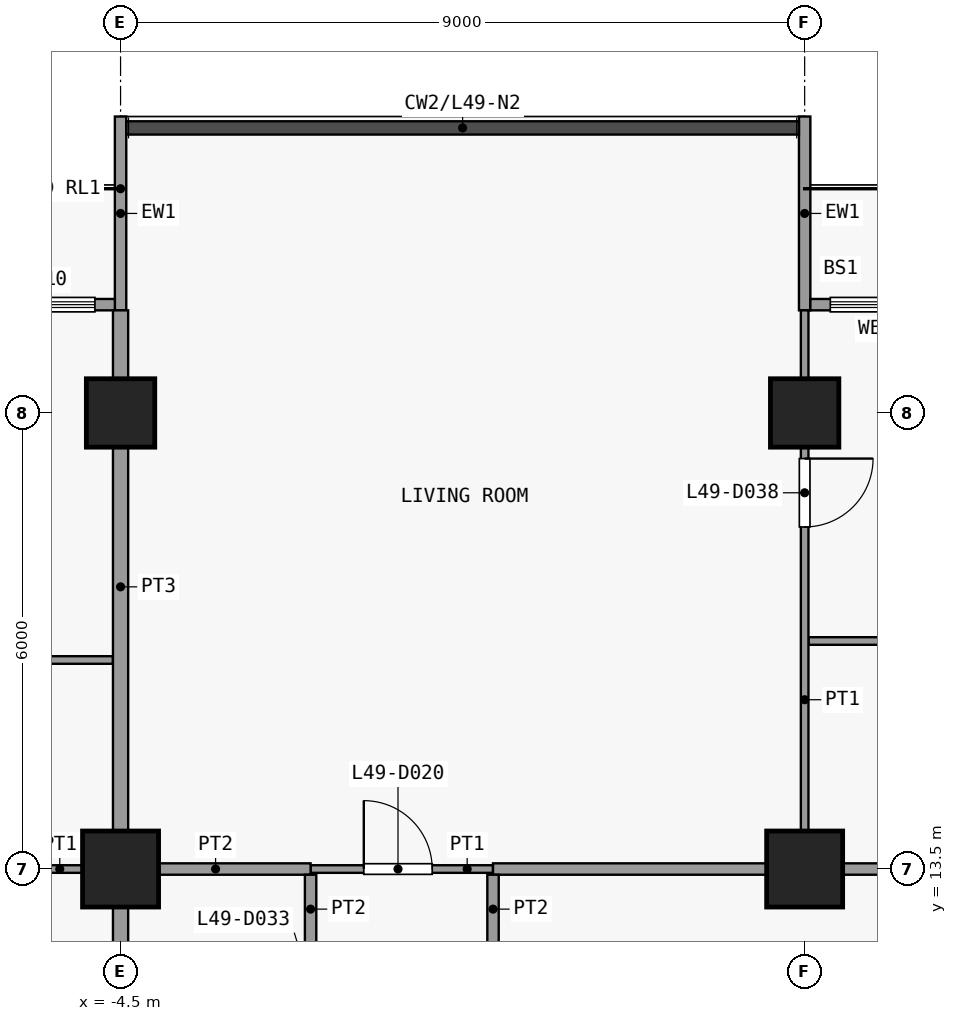
"""IFC4 building model, lengths in metres.
Left out: names, types, materials, properties, quantities, classifications, styles, units other than length and angle.
Written with IfcOpenShell. Run it as: python <this file> out.ifc"""

import sys

from ifc_helpers import new_model, si_unit, direction, frame, frame_2d, origin, origin_2d, place, context, subcontext, project, spatial, rectangle, extrude, element, fill, save


model = new_model("IFC4")
c1 = context("Model", 3, precision=1e-05, world=origin(), true_north=direction((0.0, 1.0)))
c2 = subcontext(c1, "Body", "Model", "MODEL_VIEW")
j1 = project(units=[si_unit("LENGTHUNIT", "METRE"), si_unit("PLANEANGLEUNIT", "RADIAN")], contexts=[c1])
p1 = place(None, origin())
s1 = spatial("IfcSite", under=j1, at=p1, CompositionType="ELEMENT")
p2 = place(p1, origin())
s2 = spatial("IfcBuilding", under=s1, at=p2, CompositionType="ELEMENT")
p3 = place(p2, frame((0.0, 0.0, 196.1)))
s3 = spatial("IfcBuildingStorey", under=s2, at=p3, CompositionType="ELEMENT", Elevation=196.1)
p4 = place(p3, frame((-4.5, 13.5, 0.0), z_axis=(0.0, 0.0, 1.0), x_axis=(1.0, 0.0, 0.0)))
e1 = element("IfcColumn", 1, at=p4, inside=s3, PredefinedType="COLUMN", context=c2, shape_type="SweptSolid", body=[
    extrude(rectangle(XDim=1.0, YDim=1.0, at=origin_2d()), origin(), (0.0, 0.0, 1.0), 3.6),
])
p5 = place(p3, frame((-4.5, 19.5, 0.0), z_axis=(0.0, 0.0, 1.0), x_axis=(1.0, 0.0, 0.0)))
e2 = element("IfcColumn", 2, at=p5, inside=s3, PredefinedType="COLUMN", context=c2, shape_type="SweptSolid", body=[
    extrude(rectangle(XDim=0.9, YDim=0.9, at=origin_2d()), origin(), (0.0, 0.0, 1.0), 3.6),
])
p6 = place(p3, frame((4.5, 13.5, 0.0), z_axis=(0.0, 0.0, 1.0), x_axis=(1.0, 0.0, 0.0)))
e3 = element("IfcColumn", 3, at=p6, inside=s3, PredefinedType="COLUMN", context=c2, shape_type="SweptSolid", body=[
    extrude(rectangle(XDim=1.0, YDim=1.0, at=origin_2d()), origin(), (0.0, 0.0, 1.0), 3.6),
])
p7 = place(p3, frame((4.5, 19.5, 0.0), z_axis=(0.0, 0.0, 1.0), x_axis=(1.0, 0.0, 0.0)))
e4 = element("IfcColumn", 4, at=p7, inside=s3, PredefinedType="COLUMN", context=c2, shape_type="SweptSolid", body=[
    extrude(rectangle(XDim=0.9, YDim=0.9, at=origin_2d()), origin(), (0.0, 0.0, 1.0), 3.6),
])
p8 = place(p3, frame((-4.5, 20.85, 0.0), z_axis=(0.0, 0.0, 1.0), x_axis=(0.0, 1.0, 0.0)))
e5 = element("IfcWall", 5, at=p8, inside=s3, PredefinedType="SOLIDWALL", context=c2, shape_type="SweptSolid", body=[
    extrude(rectangle(XDim=2.55, YDim=0.15, at=frame_2d((1.275, 0.0))), origin(), (0.0, 0.0, 1.0), 3.15),
])
p9 = place(p3, frame((-10.425, 20.925, 0.0), z_axis=(0.0, 0.0, 1.0), x_axis=(1.0, 0.0, 0.0)))
e6 = element("IfcWall", 6, at=p9, inside=s3, PredefinedType="SOLIDWALL", context=c2, shape_type="SweptSolid", body=[
    extrude(rectangle(XDim=5.85, YDim=0.15, at=frame_2d((2.925, 0.0))), origin(), (0.0, 0.0, 1.0), 3.15),
])
p10 = place(p9, frame((2.325, 0.0, 0.0)))
e7 = element("IfcOpeningElement", 7, at=p10, cuts=e6, PredefinedType="OPENING", context=c2, shape_type="SweptSolid", body=[
    extrude(rectangle(XDim=1.2, YDim=2.4, at=frame_2d((0.6, 1.2))), frame((0.0, 0.085, 0.0), z_axis=(0.0, -1.0, 0.0), x_axis=(1.0, 0.0, 0.0)), (0.0, 0.0, 1.0), 0.17),
])
p11 = place(p9, frame((0.262, 0.0, 0.9)))
e8 = element("IfcOpeningElement", 8, at=p11, cuts=e6, PredefinedType="OPENING", context=c2, shape_type="SweptSolid", body=[
    extrude(rectangle(XDim=1.8, YDim=2.1, at=frame_2d((0.9, 1.05))), frame((0.0, 0.085, 0.0), z_axis=(0.0, -1.0, 0.0), x_axis=(1.0, 0.0, 0.0)), (0.0, 0.0, 1.0), 0.17),
])
p12 = place(p9, frame((3.788, 0.0, 0.9)))
e9 = element("IfcOpeningElement", 9, at=p12, cuts=e6, PredefinedType="OPENING", context=c2, shape_type="SweptSolid", body=[
    extrude(rectangle(XDim=1.8, YDim=2.1, at=frame_2d((0.9, 1.05))), frame((0.0, 0.085, 0.0), z_axis=(0.0, -1.0, 0.0), x_axis=(1.0, 0.0, 0.0)), (0.0, 0.0, 1.0), 0.17),
])
p13 = place(p3, frame((4.5, 20.85, 0.0), z_axis=(0.0, 0.0, 1.0), x_axis=(0.0, 1.0, 0.0)))
e10 = element("IfcWall", 10, at=p13, inside=s3, PredefinedType="SOLIDWALL", context=c2, shape_type="SweptSolid", body=[
    extrude(rectangle(XDim=2.55, YDim=0.15, at=frame_2d((1.275, 0.0))), origin(), (0.0, 0.0, 1.0), 3.15),
])
p14 = place(p3, frame((4.575, 20.925, 0.0), z_axis=(0.0, 0.0, 1.0), x_axis=(1.0, 0.0, 0.0)))
e11 = element("IfcWall", 11, at=p14, inside=s3, PredefinedType="SOLIDWALL", context=c2, shape_type="SweptSolid", body=[
    extrude(rectangle(XDim=5.85, YDim=0.15, at=frame_2d((2.925, 0.0))), origin(), (0.0, 0.0, 1.0), 3.15),
])
p15 = place(p14, frame((2.325, 0.0, 0.0)))
e12 = element("IfcOpeningElement", 12, at=p15, cuts=e11, PredefinedType="OPENING", context=c2, shape_type="SweptSolid", body=[
    extrude(rectangle(XDim=1.2, YDim=2.4, at=frame_2d((0.6, 1.2))), frame((0.0, 0.085, 0.0), z_axis=(0.0, -1.0, 0.0), x_axis=(1.0, 0.0, 0.0)), (0.0, 0.0, 1.0), 0.17),
])
p16 = place(p14, frame((0.262, 0.0, 0.9)))
e13 = element("IfcOpeningElement", 13, at=p16, cuts=e11, PredefinedType="OPENING", context=c2, shape_type="SweptSolid", body=[
    extrude(rectangle(XDim=1.8, YDim=2.1, at=frame_2d((0.9, 1.05))), frame((0.0, 0.085, 0.0), z_axis=(0.0, -1.0, 0.0), x_axis=(1.0, 0.0, 0.0)), (0.0, 0.0, 1.0), 0.17),
])
p17 = place(p14, frame((3.788, 0.0, 0.9)))
e14 = element("IfcOpeningElement", 14, at=p17, cuts=e11, PredefinedType="OPENING", context=c2, shape_type="SweptSolid", body=[
    extrude(rectangle(XDim=1.8, YDim=2.1, at=frame_2d((0.9, 1.05))), frame((0.0, 0.085, 0.0), z_axis=(0.0, -1.0, 0.0), x_axis=(1.0, 0.0, 0.0)), (0.0, 0.0, 1.0), 0.17),
])
p18 = place(p3, frame((-6.1, 13.5, 0.0), z_axis=(0.0, 0.0, 1.0), x_axis=(1.0, 0.0, 0.0)))
e15 = element("IfcWall", 15, at=p18, inside=s3, PredefinedType="PARTITIONING", context=c2, shape_type="SweptSolid", body=[
    extrude(rectangle(XDim=1.6, YDim=0.1, at=frame_2d((0.8, 0.0))), origin(), (0.0, 0.0, 1.0), 3.15),
])
p19 = place(p3, frame((-2.0, 13.5, 0.0), z_axis=(0.0, 0.0, 1.0), x_axis=(1.0, 0.0, 0.0)))
e16 = element("IfcWall", 16, at=p19, inside=s3, PredefinedType="PARTITIONING", context=c2, shape_type="SweptSolid", body=[
    extrude(rectangle(XDim=2.4, YDim=0.1, at=frame_2d((1.2, 0.0))), origin(), (0.0, 0.0, 1.0), 3.15),
])
p20 = place(p19, frame((0.7, 0.0, 0.0)))
e17 = element("IfcOpeningElement", 17, at=p20, cuts=e16, PredefinedType="OPENING", context=c2, shape_type="SweptSolid", body=[
    extrude(rectangle(XDim=0.9, YDim=2.1, at=frame_2d((0.45, 1.05))), frame((0.0, 0.06, 0.0), z_axis=(0.0, -1.0, 0.0), x_axis=(1.0, 0.0, 0.0)), (0.0, 0.0, 1.0), 0.12),
])
p21 = place(p3, frame((-4.5, 13.5, 0.0), z_axis=(0.0, 0.0, 1.0), x_axis=(1.0, 0.0, 0.0)))
e18 = element("IfcWall", 18, at=p21, inside=s3, PredefinedType="PARTITIONING", context=c2, shape_type="SweptSolid", body=[
    extrude(rectangle(XDim=2.5, YDim=0.15, at=frame_2d((1.25, 0.0))), origin(), (0.0, 0.0, 1.0), 3.15),
])
p22 = place(p3, frame((0.4, 13.5, 0.0), z_axis=(0.0, 0.0, 1.0), x_axis=(1.0, 0.0, 0.0)))
e19 = element("IfcWall", 19, at=p22, inside=s3, PredefinedType="PARTITIONING", context=c2, shape_type="SweptSolid", body=[
    extrude(rectangle(XDim=10.667, YDim=0.15, at=frame_2d((5.333, 0.0))), origin(), (0.0, 0.0, 1.0), 3.15),
])
p23 = place(p3, frame((-10.45, 16.25, 0.0), z_axis=(0.0, 0.0, 1.0), x_axis=(1.0, 0.0, 0.0)))
e20 = element("IfcWall", 20, at=p23, inside=s3, PredefinedType="PARTITIONING", context=c2, shape_type="SweptSolid", body=[
    extrude(rectangle(XDim=5.85, YDim=0.1, at=frame_2d((2.925, 0.0))), origin(), (0.0, 0.0, 1.0), 3.15),
])
p24 = place(p23, frame((2.5, 0.0, 0.0)))
e21 = element("IfcOpeningElement", 21, at=p24, cuts=e20, PredefinedType="OPENING", context=c2, shape_type="SweptSolid", body=[
    extrude(rectangle(XDim=0.9, YDim=2.1, at=frame_2d((0.45, 1.05))), frame((0.0, 0.06, 0.0), z_axis=(0.0, -1.0, 0.0), x_axis=(1.0, 0.0, 0.0)), (0.0, 0.0, 1.0), 0.12),
])
p25 = place(p3, frame((4.55, 16.5, 0.0), z_axis=(0.0, 0.0, 1.0), x_axis=(1.0, 0.0, 0.0)))
e22 = element("IfcWall", 22, at=p25, inside=s3, PredefinedType="PARTITIONING", context=c2, shape_type="SweptSolid", body=[
    extrude(rectangle(XDim=5.9, YDim=0.1, at=frame_2d((2.95, 0.0))), origin(), (0.0, 0.0, 1.0), 3.15),
])
p26 = place(p25, frame((2.5, 0.0, 0.0)))
e23 = element("IfcOpeningElement", 23, at=p26, cuts=e22, PredefinedType="OPENING", context=c2, shape_type="SweptSolid", body=[
    extrude(rectangle(XDim=0.9, YDim=2.1, at=frame_2d((0.45, 1.05))), frame((0.0, 0.06, 0.0), z_axis=(0.0, -1.0, 0.0), x_axis=(1.0, 0.0, 0.0)), (0.0, 0.0, 1.0), 0.12),
])
p27 = place(p3, frame((-4.5, 10.6, 0.0), z_axis=(0.0, 0.0, 1.0), x_axis=(0.0, 1.0, 0.0)))
e24 = element("IfcWall", 24, at=p27, inside=s3, PredefinedType="PARTITIONING", context=c2, shape_type="SweptSolid", body=[
    extrude(rectangle(XDim=2.825, YDim=0.2, at=frame_2d((1.413, 0.0))), origin(), (0.0, 0.0, 1.0), 3.15),
])
p28 = place(p3, frame((-4.5, 13.575, 0.0), z_axis=(0.0, 0.0, 1.0), x_axis=(0.0, 1.0, 0.0)))
e25 = element("IfcWall", 25, at=p28, inside=s3, PredefinedType="PARTITIONING", context=c2, shape_type="SweptSolid", body=[
    extrude(rectangle(XDim=7.275, YDim=0.2, at=frame_2d((3.638, 0.0))), origin(), (0.0, 0.0, 1.0), 3.15),
])
p29 = place(p3, frame((-2.0, 10.6, 0.0), z_axis=(0.0, 0.0, 1.0), x_axis=(0.0, 1.0, 0.0)))
e26 = element("IfcWall", 26, at=p29, inside=s3, PredefinedType="PARTITIONING", context=c2, shape_type="SweptSolid", body=[
    extrude(rectangle(XDim=2.825, YDim=0.15, at=frame_2d((1.413, 0.0))), origin(), (0.0, 0.0, 1.0), 3.15),
])
p30 = place(p29, frame((0.9, 0.0, 0.0)))
e27 = element("IfcOpeningElement", 27, at=p30, cuts=e26, PredefinedType="OPENING", context=c2, shape_type="SweptSolid", body=[
    extrude(rectangle(XDim=0.9, YDim=2.1, at=frame_2d((0.45, 1.05))), frame((0.0, 0.085, 0.0), z_axis=(0.0, -1.0, 0.0), x_axis=(1.0, 0.0, 0.0)), (0.0, 0.0, 1.0), 0.17),
])
p31 = place(p3, frame((0.4, 10.6, 0.0), z_axis=(0.0, 0.0, 1.0), x_axis=(0.0, 1.0, 0.0)))
e28 = element("IfcWall", 28, at=p31, inside=s3, PredefinedType="PARTITIONING", context=c2, shape_type="SweptSolid", body=[
    extrude(rectangle(XDim=2.825, YDim=0.15, at=frame_2d((1.413, 0.0))), origin(), (0.0, 0.0, 1.0), 3.15),
])
p32 = place(p31, frame((0.9, 0.0, 0.0)))
e29 = element("IfcOpeningElement", 29, at=p32, cuts=e28, PredefinedType="OPENING", context=c2, shape_type="SweptSolid", body=[
    extrude(rectangle(XDim=0.9, YDim=2.1, at=frame_2d((0.45, 1.05))), frame((0.0, 0.085, 0.0), z_axis=(0.0, -1.0, 0.0), x_axis=(1.0, 0.0, 0.0)), (0.0, 0.0, 1.0), 0.17),
])
p33 = place(p3, frame((4.5, 13.575, 0.0), z_axis=(0.0, 0.0, 1.0), x_axis=(0.0, 1.0, 0.0)))
e30 = element("IfcWall", 30, at=p33, inside=s3, PredefinedType="PARTITIONING", context=c2, shape_type="SweptSolid", body=[
    extrude(rectangle(XDim=7.275, YDim=0.1, at=frame_2d((3.638, 0.0))), origin(), (0.0, 0.0, 1.0), 3.15),
])
p34 = place(p33, frame((4.425, 0.0, 0.0)))
e31 = element("IfcOpeningElement", 31, at=p34, cuts=e30, PredefinedType="OPENING", context=c2, shape_type="SweptSolid", body=[
    extrude(rectangle(XDim=0.9, YDim=2.1, at=frame_2d((0.45, 1.05))), frame((0.0, 0.06, 0.0), z_axis=(0.0, -1.0, 0.0), x_axis=(1.0, 0.0, 0.0)), (0.0, 0.0, 1.0), 0.12),
])
p35 = place(p12, origin())
e32 = element("IfcWindow", 32, at=p35, inside=s3, PartitioningType="SINGLE_PANEL", PredefinedType="WINDOW", context=c2, shape_type="SweptSolid", body=[
    extrude(rectangle(XDim=1.8, YDim=2.1, at=frame_2d((0.9, 1.05))), frame((0.0, 0.03, 0.0), z_axis=(0.0, -1.0, 0.0), x_axis=(1.0, 0.0, 0.0)), (0.0, 0.0, 1.0), 0.06),
])
fill(e9, e32)
p36 = place(p16, origin())
e33 = element("IfcWindow", 33, at=p36, inside=s3, PartitioningType="SINGLE_PANEL", PredefinedType="WINDOW", context=c2, shape_type="SweptSolid", body=[
    extrude(rectangle(XDim=1.8, YDim=2.1, at=frame_2d((0.9, 1.05))), frame((0.0, 0.03, 0.0), z_axis=(0.0, -1.0, 0.0), x_axis=(1.0, 0.0, 0.0)), (0.0, 0.0, 1.0), 0.06),
])
fill(e13, e33)
p37 = place(p20, origin())
e34 = element("IfcDoor", 34, at=p37, inside=s3, OperationType="SINGLE_SWING_RIGHT", PredefinedType="DOOR", context=c2, shape_type="SweptSolid", body=[
    extrude(rectangle(XDim=0.9, YDim=2.1, at=frame_2d((0.45, 1.05))), frame((0.0, 0.025, 0.0), z_axis=(0.0, -1.0, 0.0), x_axis=(1.0, 0.0, 0.0)), (0.0, 0.0, 1.0), 0.05),
])
fill(e17, e34)
p38 = place(p34, origin())
e35 = element("IfcDoor", 35, at=p38, inside=s3, OperationType="SINGLE_SWING_RIGHT", PredefinedType="DOOR", context=c2, shape_type="SweptSolid", body=[
    extrude(rectangle(XDim=0.9, YDim=2.1, at=frame_2d((0.45, 1.05))), frame((0.0, 0.025, 0.0), z_axis=(0.0, -1.0, 0.0), x_axis=(1.0, 0.0, 0.0)), (0.0, 0.0, 1.0), 0.05),
])
fill(e31, e35)
save(model, sys.argv[1])
